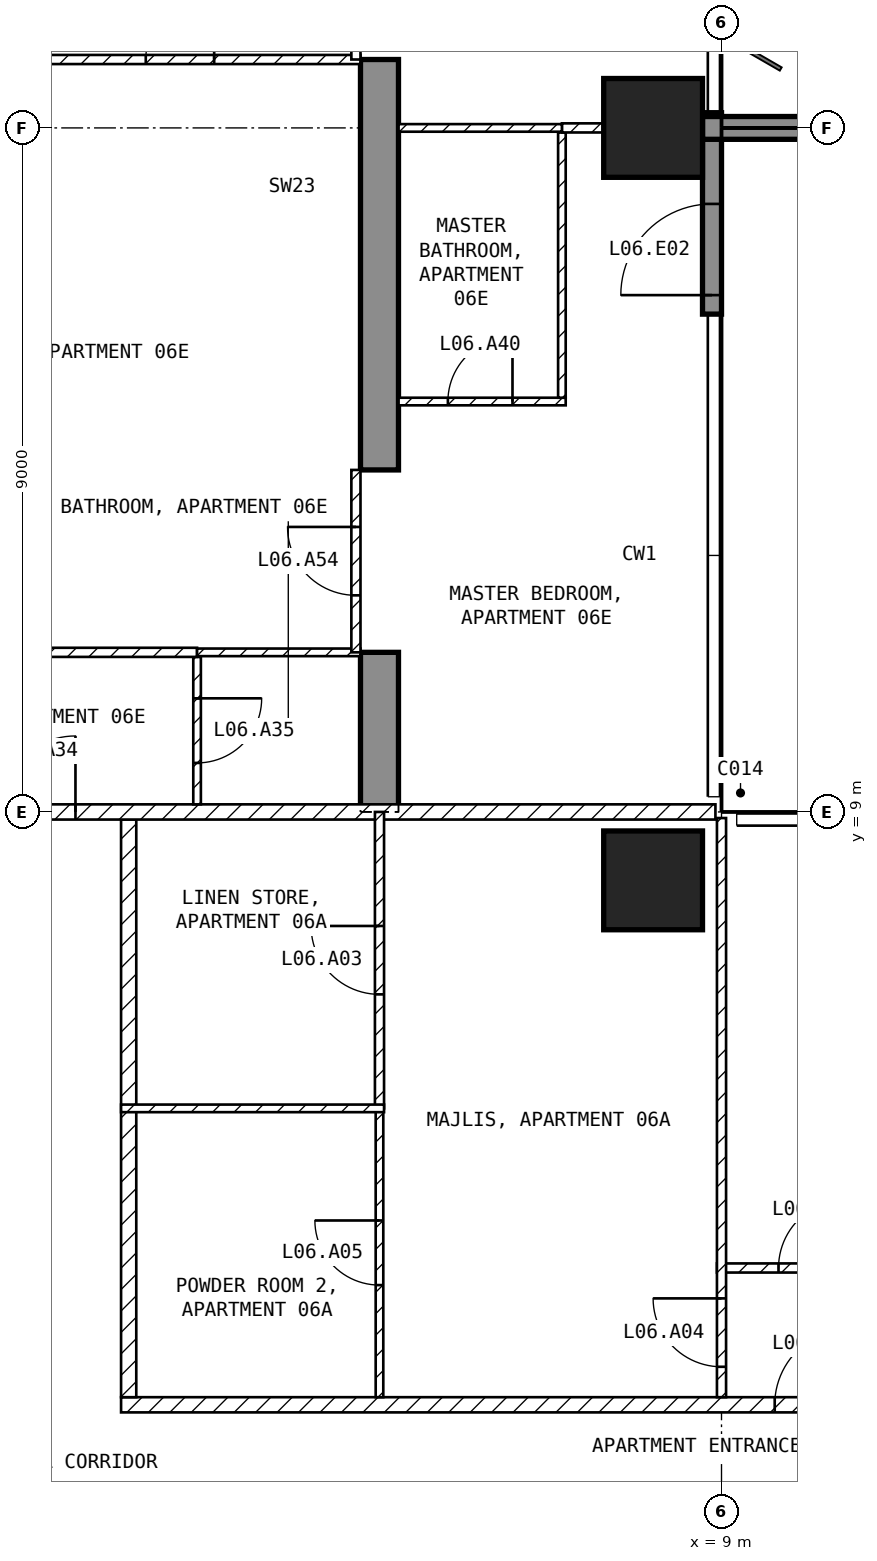
"""IFC4 building model, lengths in metres.
Left out: names, types, materials, properties, quantities, classifications, styles, units other than length and angle.
Written with IfcOpenShell. Run it as: python <this file> out.ifc"""

import sys

from ifc_helpers import new_model, si_unit, direction, frame, frame_2d, origin, origin_2d, place, context, subcontext, project, spatial, polyline, rectangle, outline, extrude, element, fill, save


model = new_model("IFC4")
c1 = context("Model", 3, precision=1e-05, world=origin(), true_north=direction((0.0, 1.0)))
c2 = subcontext(c1, "Body", "Model", "MODEL_VIEW")
j1 = project(units=[si_unit("LENGTHUNIT", "METRE"), si_unit("PLANEANGLEUNIT", "RADIAN")], contexts=[c1])
p1 = place(None, origin())
s1 = spatial("IfcSite", under=j1, at=p1, CompositionType="ELEMENT")
p2 = place(p1, origin())
s2 = spatial("IfcBuilding", under=s1, at=p2, CompositionType="ELEMENT")
p3 = place(p2, frame((0.0, 0.0, 40.0)))
s3 = spatial("IfcBuildingStorey", under=s2, at=p3, CompositionType="ELEMENT", Elevation=40.0)
for number, where, z_axis, x_axis in (
    (1, (8.1, 8.1, -0.25), (0.0, 0.0, 1.0), (1.0, 0.0, 0.0)),
    (2, (8.1, 18.0, -0.25), (0.0, 0.0, 1.0), (1.0, 0.0, 0.0)),
):
    element("IfcColumn", number, at=place(p3, frame(where, z_axis=z_axis, x_axis=x_axis)), inside=s3, PredefinedType="COLUMN", context=c2, shape_type="SweptSolid", body=[
        extrude(rectangle(XDim=1.3, YDim=1.3, at=origin_2d()), origin(), (0.0, 0.0, 1.0), 3.5),
    ])
p4 = place(p3, frame((4.25, 9.0, -0.25), z_axis=(1.0, 0.0, 0.0), x_axis=(0.0, 1.0, 0.0)))
e3 = element("IfcWall", 3, at=p4, inside=s3, PredefinedType="SHEAR", context=c2, shape_type="SweptSolid", body=[
    extrude(outline(polyline([(0.0, 0.0), (2.1, 0.0), (2.1, 2.65), (4.5, 2.65), (4.5, 0.0), (9.9, 0.0), (9.9, 2.65), (12.3, 2.65), (12.3, 0.0), (16.45, 0.0), (16.45, 3.5), (0.0, 3.5), (0.0, 0.0)])), origin(), (0.0, 0.0, 1.0), 0.5),
])
p5 = place(p3, frame((8.875, 15.55, 0.0), z_axis=(0.0, 0.0, 1.0), x_axis=(0.0, 1.0, 0.0)))
e4 = element("IfcWall", 4, at=p5, inside=s3, PredefinedType="SOLIDWALL", context=c2, shape_type="SweptSolid", body=[
    extrude(rectangle(XDim=2.65, YDim=0.25, at=frame_2d((1.325, 0.0))), origin(), (0.0, 0.0, 1.0), 3.25),
])
p6 = place(p5, frame((0.25, 0.0, 0.0)))
e5 = element("IfcOpeningElement", 5, at=p6, cuts=e4, PredefinedType="OPENING", context=c2, shape_type="SweptSolid", body=[
    extrude(rectangle(XDim=1.2, YDim=2.4, at=frame_2d((0.6, 1.2))), frame((0.0, 0.135, 0.0), z_axis=(0.0, -1.0, 0.0), x_axis=(1.0, 0.0, 0.0)), (0.0, 0.0, 1.0), 0.27),
])
p7 = place(p3, frame((8.75, 18.0, 0.0), z_axis=(0.0, 0.0, 1.0), x_axis=(1.0, 0.0, 0.0)))
e6 = element("IfcWall", 6, at=p7, inside=s3, PredefinedType="SOLIDWALL", context=c2, shape_type="SweptSolid", body=[
    extrude(rectangle(XDim=2.95, YDim=0.3, at=frame_2d((1.475, 0.0))), origin(), (0.0, 0.0, 1.0), 3.25),
])
p8 = place(p3, frame((1.1, 1.2, 0.0), z_axis=(0.0, 0.0, 1.0), x_axis=(1.0, 0.0, 0.0)))
e7 = element("IfcWall", 7, at=p8, inside=s3, PredefinedType="PARTITIONING", context=c2, shape_type="SweptSolid", body=[
    extrude(rectangle(XDim=20.5, YDim=0.2, at=frame_2d((10.25, 0.0))), origin(), (0.0, 0.0, 1.0), 3.25),
])
p9 = place(p8, frame((8.6, 0.0, 0.0)))
e8 = element("IfcOpeningElement", 8, at=p9, cuts=e7, PredefinedType="OPENING", context=c2, shape_type="SweptSolid", body=[
    extrude(rectangle(XDim=1.0, YDim=2.1, at=frame_2d((0.5, 1.05))), frame((0.0, 0.11, 0.0), z_axis=(0.0, -1.0, 0.0), x_axis=(1.0, 0.0, 0.0)), (0.0, 0.0, 1.0), 0.22),
])
p10 = place(p3, frame((1.2, 8.9, 0.0), z_axis=(0.0, 0.0, 1.0), x_axis=(0.0, -1.0, 0.0)))
e9 = element("IfcWall", 9, at=p10, inside=s3, PredefinedType="PARTITIONING", context=c2, shape_type="SweptSolid", body=[
    extrude(rectangle(XDim=7.6, YDim=0.2, at=frame_2d((3.8, 0.0))), origin(), (0.0, 0.0, 1.0), 3.25),
])
p11 = place(p3, frame((-8.92, 9.0, 0.0), z_axis=(0.0, 0.0, 1.0), x_axis=(1.0, 0.0, 0.0)))
e10 = element("IfcWall", 10, at=p11, inside=s3, PredefinedType="PARTITIONING", context=c2, shape_type="SweptSolid", body=[
    extrude(rectangle(XDim=17.84, YDim=0.2, at=frame_2d((8.92, 0.0))), origin(), (0.0, 0.0, 1.0), 3.25),
])
p12 = place(p11, frame((8.42, 0.0, 0.0)))
e11 = element("IfcOpeningElement", 11, at=p12, cuts=e10, PredefinedType="OPENING", context=c2, shape_type="SweptSolid", body=[
    extrude(rectangle(XDim=1.0, YDim=2.1, at=frame_2d((0.5, 1.05))), frame((0.0, 0.11, 0.0), z_axis=(0.0, -1.0, 0.0), x_axis=(1.0, 0.0, 0.0)), (0.0, 0.0, 1.0), 0.22),
])
p13 = place(p3, frame((8.94, 3.0, 0.0), z_axis=(0.0, 0.0, 1.0), x_axis=(1.0, 0.0, 0.0)))
e12 = element("IfcWall", 12, at=p13, inside=s3, PredefinedType="PARTITIONING", context=c2, shape_type="SweptSolid", body=[
    extrude(rectangle(XDim=5.46, YDim=0.12, at=frame_2d((2.73, 0.0))), origin(), (0.0, 0.0, 1.0), 3.25),
])
p14 = place(p13, frame((0.81, 0.0, 0.0)))
e13 = element("IfcOpeningElement", 13, at=p14, cuts=e12, PredefinedType="OPENING", context=c2, shape_type="SweptSolid", body=[
    extrude(rectangle(XDim=0.9, YDim=2.1, at=frame_2d((0.45, 1.05))), frame((0.0, 0.07, 0.0), z_axis=(0.0, -1.0, 0.0), x_axis=(1.0, 0.0, 0.0)), (0.0, 0.0, 1.0), 0.14),
])
p15 = place(p3, frame((9.0, 1.3, 0.0), z_axis=(0.0, 0.0, 1.0), x_axis=(0.0, 1.0, 0.0)))
e14 = element("IfcWall", 14, at=p15, inside=s3, PredefinedType="PARTITIONING", context=c2, shape_type="SweptSolid", body=[
    extrude(rectangle(XDim=7.62, YDim=0.12, at=frame_2d((3.81, 0.0))), origin(), (0.0, 0.0, 1.0), 3.25),
])
p16 = place(p15, frame((0.4, 0.0, 0.0)))
e15 = element("IfcOpeningElement", 15, at=p16, cuts=e14, PredefinedType="OPENING", context=c2, shape_type="SweptSolid", body=[
    extrude(rectangle(XDim=0.9, YDim=2.1, at=frame_2d((0.45, 1.05))), frame((0.0, 0.07, 0.0), z_axis=(0.0, -1.0, 0.0), x_axis=(1.0, 0.0, 0.0)), (0.0, 0.0, 1.0), 0.14),
])
p17 = place(p3, frame((4.5, 1.3, 0.0), z_axis=(0.0, 0.0, 1.0), x_axis=(0.0, 1.0, 0.0)))
e16 = element("IfcWall", 16, at=p17, inside=s3, PredefinedType="PARTITIONING", context=c2, shape_type="SweptSolid", body=[
    extrude(rectangle(XDim=3.8, YDim=0.1, at=frame_2d((1.9, 0.0))), origin(), (0.0, 0.0, 1.0), 3.25),
])
p18 = place(p17, frame((1.475, 0.0, 0.0)))
e17 = element("IfcOpeningElement", 17, at=p18, cuts=e16, PredefinedType="OPENING", context=c2, shape_type="SweptSolid", body=[
    extrude(rectangle(XDim=0.85, YDim=2.1, at=frame_2d((0.425, 1.05))), frame((0.0, 0.06, 0.0), z_axis=(0.0, -1.0, 0.0), x_axis=(1.0, 0.0, 0.0)), (0.0, 0.0, 1.0), 0.12),
])
p19 = place(p3, frame((4.5, 5.1, 0.0), z_axis=(0.0, 0.0, 1.0), x_axis=(0.0, 1.0, 0.0)))
e18 = element("IfcWall", 18, at=p19, inside=s3, PredefinedType="PARTITIONING", context=c2, shape_type="SweptSolid", body=[
    extrude(rectangle(XDim=3.9, YDim=0.12, at=frame_2d((1.95, 0.0))), origin(), (0.0, 0.0, 1.0), 3.25),
])
p20 = place(p19, frame((1.5, 0.0, 0.0)))
e19 = element("IfcOpeningElement", 19, at=p20, cuts=e18, PredefinedType="OPENING", context=c2, shape_type="SweptSolid", body=[
    extrude(rectangle(XDim=0.9, YDim=2.1, at=frame_2d((0.45, 1.05))), frame((0.0, 0.07, 0.0), z_axis=(0.0, -1.0, 0.0), x_axis=(1.0, 0.0, 0.0)), (0.0, 0.0, 1.0), 0.14),
])
p21 = place(p3, frame((1.1, 5.1, 0.0), z_axis=(0.0, 0.0, 1.0), x_axis=(1.0, 0.0, 0.0)))
e20 = element("IfcWall", 20, at=p21, inside=s3, PredefinedType="PARTITIONING", context=c2, shape_type="SweptSolid", body=[
    extrude(rectangle(XDim=3.46, YDim=0.1, at=frame_2d((1.73, 0.0))), origin(), (0.0, 0.0, 1.0), 3.25),
])
p22 = place(p3, frame((2.1, 11.04, 0.0), z_axis=(0.0, 0.0, 1.0), x_axis=(0.0, -1.0, 0.0)))
e21 = element("IfcWall", 21, at=p22, inside=s3, PredefinedType="PARTITIONING", context=c2, shape_type="SweptSolid", body=[
    extrude(rectangle(XDim=1.94, YDim=0.1, at=frame_2d((0.97, 0.0))), origin(), (0.0, 0.0, 1.0), 3.25),
])
p23 = place(p22, frame((0.545, 0.0, 0.0)))
e22 = element("IfcOpeningElement", 22, at=p23, cuts=e21, PredefinedType="OPENING", context=c2, shape_type="SweptSolid", body=[
    extrude(rectangle(XDim=0.85, YDim=2.1, at=frame_2d((0.425, 1.05))), frame((0.0, 0.06, 0.0), z_axis=(0.0, -1.0, 0.0), x_axis=(1.0, 0.0, 0.0)), (0.0, 0.0, 1.0), 0.12),
])
p24 = place(p3, frame((-4.25, 11.1, 0.0), z_axis=(0.0, 0.0, 1.0), x_axis=(1.0, 0.0, 0.0)))
e23 = element("IfcWall", 23, at=p24, inside=s3, PredefinedType="PARTITIONING", context=c2, shape_type="SweptSolid", body=[
    extrude(rectangle(XDim=6.35, YDim=0.12, at=frame_2d((3.175, 0.0))), origin(), (0.0, 0.0, 1.0), 3.25),
])
p25 = place(p24, frame((2.725, 0.0, 0.0)))
e24 = element("IfcOpeningElement", 24, at=p25, cuts=e23, PredefinedType="OPENING", context=c2, shape_type="SweptSolid", body=[
    extrude(rectangle(XDim=0.9, YDim=2.1, at=frame_2d((0.45, 1.05))), frame((0.0, 0.07, 0.0), z_axis=(0.0, -1.0, 0.0), x_axis=(1.0, 0.0, 0.0)), (0.0, 0.0, 1.0), 0.14),
])
p26 = place(p3, frame((2.1, 11.1, 0.0), z_axis=(0.0, 0.0, 1.0), x_axis=(1.0, 0.0, 0.0)))
e25 = element("IfcWall", 25, at=p26, inside=s3, PredefinedType="PARTITIONING", context=c2, shape_type="SweptSolid", body=[
    extrude(rectangle(XDim=2.15, YDim=0.1, at=frame_2d((1.075, 0.0))), origin(), (0.0, 0.0, 1.0), 3.25),
])
p27 = place(p3, frame((-4.25, 18.9, 0.0), z_axis=(0.0, 0.0, 1.0), x_axis=(1.0, 0.0, 0.0)))
e26 = element("IfcWall", 26, at=p27, inside=s3, PredefinedType="PARTITIONING", context=c2, shape_type="SweptSolid", body=[
    extrude(rectangle(XDim=8.5, YDim=0.12, at=frame_2d((4.25, 0.0))), origin(), (0.0, 0.0, 1.0), 3.25),
])
p28 = place(p27, frame((5.675, 0.0, 0.0)))
e27 = element("IfcOpeningElement", 27, at=p28, cuts=e26, PredefinedType="OPENING", context=c2, shape_type="SweptSolid", body=[
    extrude(rectangle(XDim=0.9, YDim=2.1, at=frame_2d((0.45, 1.05))), frame((0.0, 0.07, 0.0), z_axis=(0.0, -1.0, 0.0), x_axis=(1.0, 0.0, 0.0)), (0.0, 0.0, 1.0), 0.14),
])
p29 = place(p3, frame((4.75, 14.4, 0.0), z_axis=(0.0, 0.0, 1.0), x_axis=(1.0, 0.0, 0.0)))
e28 = element("IfcWall", 28, at=p29, inside=s3, PredefinedType="PARTITIONING", context=c2, shape_type="SweptSolid", body=[
    extrude(rectangle(XDim=2.2, YDim=0.1, at=frame_2d((1.1, 0.0))), origin(), (0.0, 0.0, 1.0), 3.25),
])
p30 = place(p29, frame((0.65, 0.0, 0.0)))
e29 = element("IfcOpeningElement", 29, at=p30, cuts=e28, PredefinedType="OPENING", context=c2, shape_type="SweptSolid", body=[
    extrude(rectangle(XDim=0.85, YDim=2.1, at=frame_2d((0.425, 1.05))), frame((0.0, 0.06, 0.0), z_axis=(0.0, -1.0, 0.0), x_axis=(1.0, 0.0, 0.0)), (0.0, 0.0, 1.0), 0.12),
])
p31 = place(p3, frame((6.9, 14.45, 0.0), z_axis=(0.0, 0.0, 1.0), x_axis=(0.0, 1.0, 0.0)))
e30 = element("IfcWall", 30, at=p31, inside=s3, PredefinedType="PARTITIONING", context=c2, shape_type="SweptSolid", body=[
    extrude(rectangle(XDim=3.49, YDim=0.1, at=frame_2d((1.745, 0.0))), origin(), (0.0, 0.0, 1.0), 3.25),
])
p32 = place(p3, frame((6.9, 18.0, 0.0), z_axis=(0.0, 0.0, 1.0), x_axis=(1.0, 0.0, 0.0)))
e31 = element("IfcWall", 31, at=p32, inside=s3, PredefinedType="PARTITIONING", context=c2, shape_type="SweptSolid", body=[
    extrude(rectangle(XDim=0.55, YDim=0.12, at=frame_2d((0.275, 0.0))), origin(), (0.0, 0.0, 1.0), 2.346),
])
p33 = place(p3, frame((4.75, 18.0, 0.0), z_axis=(0.0, 0.0, 1.0), x_axis=(1.0, 0.0, 0.0)))
e32 = element("IfcWall", 32, at=p33, inside=s3, PredefinedType="PARTITIONING", context=c2, shape_type="SweptSolid", body=[
    extrude(rectangle(XDim=2.15, YDim=0.1, at=frame_2d((1.075, 0.0))), origin(), (0.0, 0.0, 1.0), 2.346),
])
p34 = place(p3, frame((4.19, 11.1, 0.0), z_axis=(0.0, 0.0, 1.0), x_axis=(0.0, 1.0, 0.0)))
e33 = element("IfcWall", 33, at=p34, inside=s3, PredefinedType="PARTITIONING", context=c2, shape_type="SweptSolid", body=[
    extrude(rectangle(XDim=2.4, YDim=0.12, at=frame_2d((1.2, 0.0))), origin(), (0.0, 0.0, 1.0), 2.4),
])
p35 = place(p34, frame((0.75, 0.0, 0.0)))
e34 = element("IfcOpeningElement", 34, at=p35, cuts=e33, PredefinedType="OPENING", context=c2, shape_type="SweptSolid", body=[
    extrude(rectangle(XDim=0.9, YDim=2.1, at=frame_2d((0.45, 1.05))), frame((0.0, 0.07, 0.0), z_axis=(0.0, -1.0, 0.0), x_axis=(1.0, 0.0, 0.0)), (0.0, 0.0, 1.0), 0.14),
])
p36 = place(p3, frame((4.19, 18.9, 0.0), z_axis=(0.0, 0.0, 1.0), x_axis=(0.0, 1.0, 0.0)))
e35 = element("IfcWall", 35, at=p36, inside=s3, PredefinedType="PARTITIONING", context=c2, shape_type="SweptSolid", body=[
    extrude(rectangle(XDim=2.4, YDim=0.12, at=frame_2d((1.2, 0.0))), origin(), (0.0, 0.0, 1.0), 2.4),
])
p37 = place(p36, frame((0.55, 0.0, 0.0)))
e36 = element("IfcOpeningElement", 36, at=p37, cuts=e35, PredefinedType="OPENING", context=c2, shape_type="SweptSolid", body=[
    extrude(rectangle(XDim=0.9, YDim=2.1, at=frame_2d((0.45, 1.05))), frame((0.0, 0.07, 0.0), z_axis=(0.0, -1.0, 0.0), x_axis=(1.0, 0.0, 0.0)), (0.0, 0.0, 1.0), 0.14),
])
p38 = place(p6, origin())
e37 = element("IfcDoor", 37, at=p38, inside=s3, OperationType="SINGLE_SWING_LEFT", PredefinedType="DOOR", context=c2, shape_type="SweptSolid", body=[
    extrude(rectangle(XDim=1.2, YDim=2.4, at=frame_2d((0.6, 1.2))), frame((0.0, 0.025, 0.0), z_axis=(0.0, -1.0, 0.0), x_axis=(1.0, 0.0, 0.0)), (0.0, 0.0, 1.0), 0.05),
])
fill(e5, e37)
p39 = place(p20, origin())
e38 = element("IfcDoor", 38, at=p39, inside=s3, OperationType="SINGLE_SWING_RIGHT", PredefinedType="DOOR", context=c2, shape_type="SweptSolid", body=[
    extrude(rectangle(XDim=0.9, YDim=2.1, at=frame_2d((0.45, 1.05))), frame((0.0, 0.025, 0.0), z_axis=(0.0, -1.0, 0.0), x_axis=(1.0, 0.0, 0.0)), (0.0, 0.0, 1.0), 0.05),
])
fill(e19, e38)
p40 = place(p16, origin())
e39 = element("IfcDoor", 39, at=p40, inside=s3, OperationType="SINGLE_SWING_RIGHT", PredefinedType="DOOR", context=c2, shape_type="SweptSolid", body=[
    extrude(rectangle(XDim=0.9, YDim=2.1, at=frame_2d((0.45, 1.05))), frame((0.0, 0.025, 0.0), z_axis=(0.0, -1.0, 0.0), x_axis=(1.0, 0.0, 0.0)), (0.0, 0.0, 1.0), 0.05),
])
fill(e15, e39)
p41 = place(p18, origin())
e40 = element("IfcDoor", 40, at=p41, inside=s3, OperationType="SINGLE_SWING_RIGHT", PredefinedType="DOOR", context=c2, shape_type="SweptSolid", body=[
    extrude(rectangle(XDim=0.85, YDim=2.1, at=frame_2d((0.425, 1.05))), frame((0.0, 0.025, 0.0), z_axis=(0.0, -1.0, 0.0), x_axis=(1.0, 0.0, 0.0)), (0.0, 0.0, 1.0), 0.05),
])
fill(e17, e40)
p42 = place(p14, origin())
e41 = element("IfcDoor", 41, at=p42, inside=s3, OperationType="SINGLE_SWING_RIGHT", PredefinedType="DOOR", context=c2, shape_type="SweptSolid", body=[
    extrude(rectangle(XDim=0.9, YDim=2.1, at=frame_2d((0.45, 1.05))), frame((0.0, 0.025, 0.0), z_axis=(0.0, -1.0, 0.0), x_axis=(1.0, 0.0, 0.0)), (0.0, 0.0, 1.0), 0.05),
])
fill(e13, e41)
p43 = place(p12, origin())
e42 = element("IfcDoor", 42, at=p43, inside=s3, OperationType="SINGLE_SWING_RIGHT", PredefinedType="DOOR", context=c2, shape_type="SweptSolid", body=[
    extrude(rectangle(XDim=1.0, YDim=2.1, at=frame_2d((0.5, 1.05))), frame((0.0, 0.025, 0.0), z_axis=(0.0, -1.0, 0.0), x_axis=(1.0, 0.0, 0.0)), (0.0, 0.0, 1.0), 0.05),
])
fill(e11, e42)
p44 = place(p23, origin())
e43 = element("IfcDoor", 43, at=p44, inside=s3, OperationType="SINGLE_SWING_LEFT", PredefinedType="DOOR", context=c2, shape_type="SweptSolid", body=[
    extrude(rectangle(XDim=0.85, YDim=2.1, at=frame_2d((0.425, 1.05))), frame((0.0, 0.025, 0.0), z_axis=(0.0, -1.0, 0.0), x_axis=(1.0, 0.0, 0.0)), (0.0, 0.0, 1.0), 0.05),
])
fill(e22, e43)
p45 = place(p28, origin())
e44 = element("IfcDoor", 44, at=p45, inside=s3, OperationType="SINGLE_SWING_RIGHT", PredefinedType="DOOR", context=c2, shape_type="SweptSolid", body=[
    extrude(rectangle(XDim=0.9, YDim=2.1, at=frame_2d((0.45, 1.05))), frame((0.0, 0.025, 0.0), z_axis=(0.0, -1.0, 0.0), x_axis=(1.0, 0.0, 0.0)), (0.0, 0.0, 1.0), 0.05),
])
fill(e27, e44)
p46 = place(p30, origin())
e45 = element("IfcDoor", 45, at=p46, inside=s3, OperationType="SINGLE_SWING_RIGHT", PredefinedType="DOOR", context=c2, shape_type="SweptSolid", body=[
    extrude(rectangle(XDim=0.85, YDim=2.1, at=frame_2d((0.425, 1.05))), frame((0.0, 0.025, 0.0), z_axis=(0.0, -1.0, 0.0), x_axis=(1.0, 0.0, 0.0)), (0.0, 0.0, 1.0), 0.05),
])
fill(e29, e45)
p47 = place(p9, origin())
e46 = element("IfcDoor", 46, at=p47, inside=s3, OperationType="SINGLE_SWING_RIGHT", PredefinedType="DOOR", context=c2, shape_type="SweptSolid", body=[
    extrude(rectangle(XDim=1.0, YDim=2.1, at=frame_2d((0.5, 1.05))), frame((0.0, 0.025, 0.0), z_axis=(0.0, -1.0, 0.0), x_axis=(1.0, 0.0, 0.0)), (0.0, 0.0, 1.0), 0.05),
])
fill(e8, e46)
p48 = place(p35, origin())
e47 = element("IfcDoor", 47, at=p48, inside=s3, OperationType="SINGLE_SWING_RIGHT", PredefinedType="DOOR", context=c2, shape_type="SweptSolid", body=[
    extrude(rectangle(XDim=0.9, YDim=2.1, at=frame_2d((0.45, 1.05))), frame((0.0, 0.025, 0.0), z_axis=(0.0, -1.0, 0.0), x_axis=(1.0, 0.0, 0.0)), (0.0, 0.0, 1.0), 0.05),
])
fill(e34, e47)
save(model, sys.argv[1])
